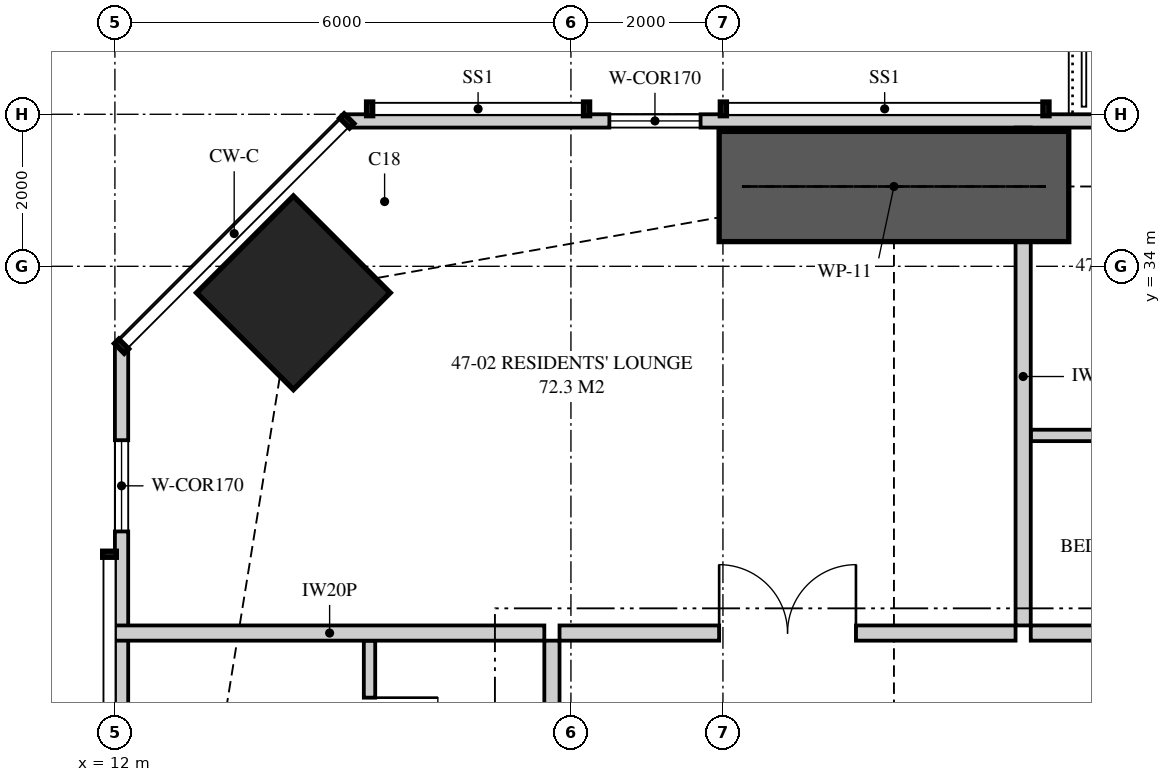
"""IFC4 building model, lengths in metres.
Left out: names, types, materials, properties, quantities, classifications, styles, units other than length and angle.
Written with IfcOpenShell. Run it as: python <this file> out.ifc"""

import sys

from ifc_helpers import new_model, si_unit, direction, frame, frame_2d, origin, origin_2d, place, context, subcontext, project, spatial, polyline, rectangle, outline, extrude, element, fill, save


model = new_model("IFC4")
c1 = context("Model", 3, precision=1e-05, world=origin(), true_north=direction((0.0, 1.0)))
c2 = subcontext(c1, "Body", "Model", "MODEL_VIEW")
j1 = project(units=[si_unit("LENGTHUNIT", "METRE"), si_unit("PLANEANGLEUNIT", "RADIAN")], contexts=[c1])
p1 = place(None, origin())
s1 = spatial("IfcSite", under=j1, at=p1, CompositionType="ELEMENT")
p2 = place(p1, origin())
s2 = spatial("IfcBuilding", under=s1, at=p2, CompositionType="ELEMENT")
p3 = place(p2, frame((0.0, 0.0, 174.45)))
s3 = spatial("IfcBuildingStorey", under=s2, at=p3, CompositionType="ELEMENT", Elevation=174.45)
p4 = place(p3, frame((14.348, 33.652, 0.0), z_axis=(0.0, 0.0, 1.0), x_axis=(0.707106781187, 0.707106781187, 0.0)))
e1 = element("IfcColumn", 1, at=p4, inside=s3, PredefinedType="COLUMN", context=c2, shape_type="SweptSolid", body=[
    extrude(rectangle(XDim=1.8, YDim=1.8, at=origin_2d()), origin(), (0.0, 0.0, 1.0), 3.35),
])
p5 = place(p3, frame((49.949, 35.913, 0.0), z_axis=(0.0, 0.0, 1.0), x_axis=(-1.0, 0.0, 0.0)))
e2 = element("IfcWall", 2, at=p5, inside=s3, PredefinedType="SOLIDWALL", context=c2, shape_type="SweptSolid", body=[
    extrude(outline(polyline([(0.0, 0.0), (34.897, 0.0), (34.897, 3.11), (27.91, 3.11), (27.91, 2.15), (27.836, 2.15), (27.836, 3.11), (27.699, 3.11), (27.699, 2.15), (7.199, 2.15), (7.199, 3.11), (7.062, 3.11), (7.062, 2.15), (6.987, 2.15), (6.987, 3.11), (0.0, 3.11), (0.0, 0.0)])), frame((0.0, 0.087, 0.0), z_axis=(0.0, -1.0, 0.0), x_axis=(1.0, 0.0, 0.0)), (0.0, 0.0, 1.0), 0.175),
])
p6 = place(p5, frame((2.3, 0.0, 0.4)))
e3 = element("IfcOpeningElement", 3, at=p6, cuts=e2, PredefinedType="OPENING", context=c2, shape_type="SweptSolid", body=[
    extrude(rectangle(XDim=2.4, YDim=1.7, at=frame_2d((1.2, 0.85))), frame((0.0, 0.097, 0.0), z_axis=(0.0, -1.0, 0.0), x_axis=(1.0, 0.0, 0.0)), (0.0, 0.0, 1.0), 0.195),
])
p7 = place(p5, frame((10.299, 0.0, 0.0)))
e4 = element("IfcOpeningElement", 4, at=p7, cuts=e2, PredefinedType="OPENING", context=c2, shape_type="SweptSolid", body=[
    extrude(rectangle(XDim=1.8, YDim=2.1, at=frame_2d((0.9, 1.05))), frame((0.0, 0.097, 0.0), z_axis=(0.0, -1.0, 0.0), x_axis=(1.0, 0.0, 0.0)), (0.0, 0.0, 1.0), 0.195),
])
p8 = place(p5, frame((13.229, 0.0, 0.4)))
e5 = element("IfcOpeningElement", 5, at=p8, cuts=e2, PredefinedType="OPENING", context=c2, shape_type="SweptSolid", body=[
    extrude(rectangle(XDim=1.8, YDim=1.7, at=frame_2d((0.9, 0.85))), frame((0.0, 0.097, 0.0), z_axis=(0.0, -1.0, 0.0), x_axis=(1.0, 0.0, 0.0)), (0.0, 0.0, 1.0), 0.195),
])
p9 = place(p5, frame((19.879, 0.0, 0.4)))
e6 = element("IfcOpeningElement", 6, at=p9, cuts=e2, PredefinedType="OPENING", context=c2, shape_type="SweptSolid", body=[
    extrude(rectangle(XDim=1.8, YDim=1.7, at=frame_2d((0.9, 0.85))), frame((0.0, 0.097, 0.0), z_axis=(0.0, -1.0, 0.0), x_axis=(1.0, 0.0, 0.0)), (0.0, 0.0, 1.0), 0.195),
])
p10 = place(p5, frame((22.699, 0.0, 0.0)))
e7 = element("IfcOpeningElement", 7, at=p10, cuts=e2, PredefinedType="OPENING", context=c2, shape_type="SweptSolid", body=[
    extrude(rectangle(XDim=1.8, YDim=2.1, at=frame_2d((0.9, 1.05))), frame((0.0, 0.097, 0.0), z_axis=(0.0, -1.0, 0.0), x_axis=(1.0, 0.0, 0.0)), (0.0, 0.0, 1.0), 0.195),
])
p11 = place(p5, frame((30.243, 0.0, 0.4)))
e8 = element("IfcOpeningElement", 8, at=p11, cuts=e2, PredefinedType="OPENING", context=c2, shape_type="SweptSolid", body=[
    extrude(rectangle(XDim=1.2, YDim=1.7, at=frame_2d((0.6, 0.85))), frame((0.0, 0.097, 0.0), z_axis=(0.0, -1.0, 0.0), x_axis=(1.0, 0.0, 0.0)), (0.0, 0.0, 1.0), 0.195),
])
p12 = place(p3, frame((12.087, 32.949, 0.0), z_axis=(0.0, 0.0, 1.0), x_axis=(0.0, -1.0, 0.0)))
e9 = element("IfcWall", 9, at=p12, inside=s3, PredefinedType="SOLIDWALL", context=c2, shape_type="SweptSolid", body=[
    extrude(outline(polyline([(0.0, 0.0), (29.897, 0.0), (29.897, 3.11), (20.191, 3.11), (20.191, 2.15), (20.051, 2.15), (20.051, 3.11), (19.949, 3.11), (19.949, 2.15), (7.949, 2.15), (7.949, 3.11), (7.823, 3.11), (7.823, 2.15), (7.73, 2.15), (7.73, 3.11), (0.0, 3.11), (0.0, 0.0)])), frame((0.0, 0.087, 0.0), z_axis=(0.0, -1.0, 0.0), x_axis=(1.0, 0.0, 0.0)), (0.0, 0.0, 1.0), 0.175),
])
p13 = place(p12, frame((1.237, 0.0, 0.4)))
e10 = element("IfcOpeningElement", 10, at=p13, cuts=e9, PredefinedType="OPENING", context=c2, shape_type="SweptSolid", body=[
    extrude(rectangle(XDim=1.2, YDim=1.7, at=frame_2d((0.6, 0.85))), frame((0.0, 0.097, 0.0), z_axis=(0.0, -1.0, 0.0), x_axis=(1.0, 0.0, 0.0)), (0.0, 0.0, 1.0), 0.195),
])
p14 = place(p12, frame((10.482, 0.0, 0.4)))
e11 = element("IfcOpeningElement", 11, at=p14, cuts=e9, PredefinedType="OPENING", context=c2, shape_type="SweptSolid", body=[
    extrude(rectangle(XDim=2.4, YDim=1.7, at=frame_2d((1.2, 0.85))), frame((0.0, 0.097, 0.0), z_axis=(0.0, -1.0, 0.0), x_axis=(1.0, 0.0, 0.0)), (0.0, 0.0, 1.0), 0.195),
])
p15 = place(p12, frame((15.735, 0.0, 0.4)))
e12 = element("IfcOpeningElement", 12, at=p15, cuts=e9, PredefinedType="OPENING", context=c2, shape_type="SweptSolid", body=[
    extrude(rectangle(XDim=1.8, YDim=1.7, at=frame_2d((0.9, 0.85))), frame((0.0, 0.097, 0.0), z_axis=(0.0, -1.0, 0.0), x_axis=(1.0, 0.0, 0.0)), (0.0, 0.0, 1.0), 0.195),
])
p16 = place(p12, frame((22.624, 0.0, 0.0)))
e13 = element("IfcOpeningElement", 13, at=p16, cuts=e9, PredefinedType="OPENING", context=c2, shape_type="SweptSolid", body=[
    extrude(rectangle(XDim=1.8, YDim=2.1, at=frame_2d((0.9, 1.05))), frame((0.0, 0.097, 0.0), z_axis=(0.0, -1.0, 0.0), x_axis=(1.0, 0.0, 0.0)), (0.0, 0.0, 1.0), 0.195),
])
p17 = place(p12, frame((26.301, 0.0, 0.4)))
e14 = element("IfcOpeningElement", 14, at=p17, cuts=e9, PredefinedType="OPENING", context=c2, shape_type="SweptSolid", body=[
    extrude(rectangle(XDim=1.8, YDim=1.7, at=frame_2d((0.9, 0.85))), frame((0.0, 0.097, 0.0), z_axis=(0.0, -1.0, 0.0), x_axis=(1.0, 0.0, 0.0)), (0.0, 0.0, 1.0), 0.195),
])
p18 = place(p3, frame((23.95, 35.825, 0.0), z_axis=(0.0, 0.0, 1.0), x_axis=(0.0, -1.0, 0.0)))
e15 = element("IfcWall", 15, at=p18, inside=s3, PredefinedType="PARTITIONING", context=c2, shape_type="SweptSolid", body=[
    extrude(outline(polyline([(0.529, 2.15), (0.0, 2.15), (0.0, 0.0), (0.529, 0.0), (0.529, 0.123), (1.021, 0.123), (1.021, 0.0), (6.55, 0.0), (6.55, 3.11), (1.685, 3.11), (1.685, 2.15), (1.021, 2.15), (1.021, 2.027), (0.529, 2.027), (0.529, 2.15)])), frame((0.0, 0.1, 0.0), z_axis=(0.0, -1.0, 0.0), x_axis=(1.0, 0.0, 0.0)), (0.0, 0.0, 1.0), 0.2),
])
p19 = place(p3, frame((17.85, 29.175, 0.0), z_axis=(0.0, 0.0, 1.0), x_axis=(1.0, 0.0, 0.0)))
e16 = element("IfcWall", 16, at=p19, inside=s3, PredefinedType="PARTITIONING", context=c2, shape_type="SweptSolid", body=[
    extrude(outline(polyline([(0.0, 0.0), (6.0, 0.0), (6.0, 3.11), (4.737, 3.11), (4.737, 2.541), (4.062, 2.541), (4.062, 3.11), (0.0, 3.11), (0.0, 0.0)])), frame((0.0, 0.1, 0.0), z_axis=(0.0, -1.0, 0.0), x_axis=(1.0, 0.0, 0.0)), (0.0, 0.0, 1.0), 0.2),
])
p20 = place(p19, frame((2.1, 0.0, 0.0)))
e17 = element("IfcOpeningElement", 17, at=p20, cuts=e16, PredefinedType="OPENING", context=c2, shape_type="SweptSolid", body=[
    extrude(rectangle(XDim=1.8, YDim=2.1, at=frame_2d((0.9, 1.05))), frame((0.0, 0.11, 0.0), z_axis=(0.0, -1.0, 0.0), x_axis=(1.0, 0.0, 0.0)), (0.0, 0.0, 1.0), 0.22),
])
p21 = place(p3, frame((24.05, 29.175, 0.0), z_axis=(0.0, 0.0, 1.0), x_axis=(1.0, 0.0, 0.0)))
e18 = element("IfcWall", 18, at=p21, inside=s3, PredefinedType="PARTITIONING", context=c2, shape_type="SweptSolid", body=[
    extrude(outline(polyline([(0.0, 0.0), (21.9, 0.0), (21.9, 3.11), (19.037, 3.11), (19.037, 2.541), (18.363, 2.541), (18.363, 3.11), (8.787, 3.11), (8.787, 2.541), (8.113, 2.541), (8.113, 3.11), (0.0, 3.11), (0.0, 0.0)])), frame((0.0, 0.1, 0.0), z_axis=(0.0, -1.0, 0.0), x_axis=(1.0, 0.0, 0.0)), (0.0, 0.0, 1.0), 0.2),
])
p22 = place(p21, frame((13.925, 0.0, 0.0)))
e19 = element("IfcOpeningElement", 19, at=p22, cuts=e18, PredefinedType="OPENING", context=c2, shape_type="SweptSolid", body=[
    extrude(rectangle(XDim=1.05, YDim=2.2, at=frame_2d((0.525, 1.1))), frame((0.0, 0.11, 0.0), z_axis=(0.0, -1.0, 0.0), x_axis=(1.0, 0.0, 0.0)), (0.0, 0.0, 1.0), 0.22),
])
p23 = place(p3, frame((24.05, 31.775, 0.0), z_axis=(0.0, 0.0, 1.0), x_axis=(1.0, 0.0, 0.0)))
e20 = element("IfcWall", 20, at=p23, inside=s3, PredefinedType="PLUMBINGWALL", context=c2, shape_type="SweptSolid", body=[
    extrude(rectangle(XDim=3.45, YDim=0.15, at=frame_2d((1.725, 0.0))), origin(), (0.0, 0.0, 1.0), 3.11),
])
p24 = place(p23, frame((2.15, 0.0, 0.0)))
e21 = element("IfcOpeningElement", 21, at=p24, cuts=e20, PredefinedType="OPENING", context=c2, shape_type="SweptSolid", body=[
    extrude(rectangle(XDim=0.9, YDim=2.1, at=frame_2d((0.45, 1.05))), frame((0.0, 0.085, 0.0), z_axis=(0.0, -1.0, 0.0), x_axis=(1.0, 0.0, 0.0)), (0.0, 0.0, 1.0), 0.17),
])
p25 = place(p3, frame((12.0, 29.175, 0.0), z_axis=(0.0, 0.0, 1.0), x_axis=(1.0, 0.0, 0.0)))
e22 = element("IfcWall", 22, at=p25, inside=s3, PredefinedType="PARTITIONING", context=c2, shape_type="SweptSolid", body=[
    extrude(outline(polyline([(0.0, 0.0), (5.65, 0.0), (5.65, 3.11), (2.547, 3.11), (2.547, 2.15), (0.703, 2.15), (0.703, 3.11), (0.0, 3.11), (0.0, 0.0)])), frame((0.0, 0.1, 0.0), z_axis=(0.0, -1.0, 0.0), x_axis=(1.0, 0.0, 0.0)), (0.0, 0.0, 1.0), 0.2),
])
p26 = place(p3, frame((17.75, 13.95, 0.0), z_axis=(0.0, 0.0, 1.0), x_axis=(0.0, 1.0, 0.0)))
e23 = element("IfcWall", 23, at=p26, inside=s3, PredefinedType="PARTITIONING", context=c2, shape_type="SweptSolid", body=[
    extrude(outline(polyline([(0.0, 0.0), (15.125, 0.0), (15.125, 3.11), (11.387, 3.11), (11.387, 2.541), (10.713, 2.541), (10.713, 3.11), (0.0, 3.11), (0.0, 0.0)])), frame((0.0, 0.1, 0.0), z_axis=(0.0, -1.0, 0.0), x_axis=(1.0, 0.0, 0.0)), (0.0, 0.0, 1.0), 0.2),
])
p27 = place(p26, frame((7.062, 0.0, 0.0)))
e24 = element("IfcOpeningElement", 24, at=p27, cuts=e23, PredefinedType="OPENING", context=c2, shape_type="SweptSolid", body=[
    extrude(rectangle(XDim=1.05, YDim=2.2, at=frame_2d((0.525, 1.1))), frame((0.0, 0.11, 0.0), z_axis=(0.0, -1.0, 0.0), x_axis=(1.0, 0.0, 0.0)), (0.0, 0.0, 1.0), 0.22),
])
p28 = place(p3, frame((15.35, 26.65, 0.0), z_axis=(0.0, 0.0, 1.0), x_axis=(0.0, 1.0, 0.0)))
e25 = element("IfcWall", 25, at=p28, inside=s3, PredefinedType="PLUMBINGWALL", context=c2, shape_type="SweptSolid", body=[
    extrude(rectangle(XDim=2.425, YDim=0.15, at=frame_2d((1.212, 0.0))), origin(), (0.0, 0.0, 1.0), 3.11),
])
p29 = place(p28, frame((0.775, 0.0, 0.0)))
e26 = element("IfcOpeningElement", 26, at=p29, cuts=e25, PredefinedType="OPENING", context=c2, shape_type="SweptSolid", body=[
    extrude(rectangle(XDim=0.9, YDim=2.1, at=frame_2d((0.45, 1.05))), frame((0.0, 0.085, 0.0), z_axis=(0.0, -1.0, 0.0), x_axis=(1.0, 0.0, 0.0)), (0.0, 0.0, 1.0), 0.17),
])
p30 = place(p3, frame((19.95, 35.05, 0.0), z_axis=(0.0, 0.0, 1.0), x_axis=(1.0, 0.0, 0.0)))
e27 = element("IfcWall", 27, at=p30, inside=s3, PredefinedType="SHEAR", context=c2, shape_type="SweptSolid", body=[
    extrude(rectangle(XDim=4.6, YDim=1.45, at=frame_2d((2.3, 0.0))), origin(), (0.0, 0.0, 1.0), 3.35),
])
p31 = place(p11, origin())
e28 = element("IfcWindow", 28, at=p31, inside=s3, PartitioningType="SINGLE_PANEL", PredefinedType="WINDOW", context=c2, shape_type="SweptSolid", body=[
    extrude(rectangle(XDim=1.2, YDim=1.7, at=frame_2d((0.6, 0.85))), frame((0.0, 0.03, 0.0), z_axis=(0.0, -1.0, 0.0), x_axis=(1.0, 0.0, 0.0)), (0.0, 0.0, 1.0), 0.06),
])
fill(e8, e28)
p32 = place(p13, origin())
e29 = element("IfcWindow", 29, at=p32, inside=s3, PartitioningType="SINGLE_PANEL", PredefinedType="WINDOW", context=c2, shape_type="SweptSolid", body=[
    extrude(rectangle(XDim=1.2, YDim=1.7, at=frame_2d((0.6, 0.85))), frame((0.0, 0.03, 0.0), z_axis=(0.0, -1.0, 0.0), x_axis=(1.0, 0.0, 0.0)), (0.0, 0.0, 1.0), 0.06),
])
fill(e10, e29)
p33 = place(p20, origin())
e30 = element("IfcDoor", 30, at=p33, inside=s3, OperationType="DOUBLE_DOOR_SINGLE_SWING", PredefinedType="DOOR", context=c2, shape_type="SweptSolid", body=[
    extrude(rectangle(XDim=1.8, YDim=2.1, at=frame_2d((0.9, 1.05))), frame((0.0, 0.025, 0.0), z_axis=(0.0, -1.0, 0.0), x_axis=(1.0, 0.0, 0.0)), (0.0, 0.0, 1.0), 0.05),
])
fill(e17, e30)
p34 = place(p29, frame((0.9, 0.0, 0.0), z_axis=(0.0, 0.0, 1.0), x_axis=(-1.0, 0.0, 0.0)))
e31 = element("IfcDoor", 31, at=p34, inside=s3, OperationType="SINGLE_SWING_LEFT", PredefinedType="DOOR", context=c2, shape_type="SweptSolid", body=[
    extrude(rectangle(XDim=0.9, YDim=2.1, at=frame_2d((0.45, 1.05))), frame((0.0, 0.025, 0.0), z_axis=(0.0, -1.0, 0.0), x_axis=(1.0, 0.0, 0.0)), (0.0, 0.0, 1.0), 0.05),
])
fill(e26, e31)
save(model, sys.argv[1])
